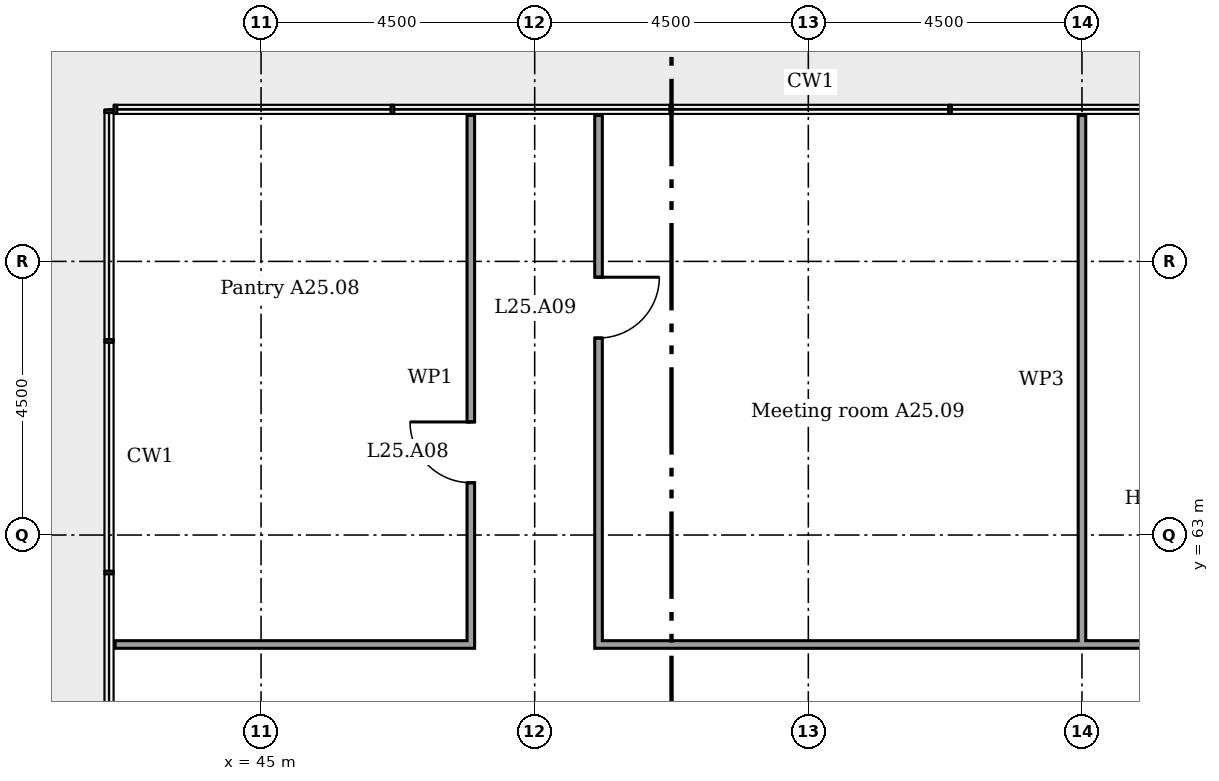
"""IFC4 building model, lengths in metres.
Left out: names, types, materials, properties, quantities, classifications, styles, units other than length and angle.
Written with IfcOpenShell. Run it as: python <this file> out.ifc"""

import sys

from ifc_helpers import new_model, si_unit, direction, frame, frame_2d, origin, place, context, subcontext, project, spatial, rectangle, extrude, element, fill, save


model = new_model("IFC4")
c1 = context("Model", 3, precision=1e-05, world=origin(), true_north=direction((0.0, 1.0)))
c2 = subcontext(c1, "Body", "Model", "MODEL_VIEW")
j1 = project(units=[si_unit("LENGTHUNIT", "METRE"), si_unit("PLANEANGLEUNIT", "RADIAN")], contexts=[c1])
p1 = place(None, origin())
s1 = spatial("IfcSite", under=j1, at=p1, CompositionType="ELEMENT")
p2 = place(p1, origin())
s2 = spatial("IfcBuilding", under=s1, at=p2, CompositionType="ELEMENT")
p3 = place(p2, frame((0.0, 0.0, 102.8)))
s3 = spatial("IfcBuildingStorey", under=s2, at=p3, CompositionType="ELEMENT", Elevation=102.8)
p4 = place(p3, frame((42.6, 61.2, 0.0)))
e1 = element("IfcWall", 1, at=p4, inside=s3, PredefinedType="PARTITIONING", context=c2, shape_type="SweptSolid", body=[
    extrude(rectangle(XDim=5.912, YDim=0.125, at=frame_2d((2.956, 0.0))), origin(), (0.0, 0.0, 1.0), 3.45),
])
p5 = place(p3, frame((50.488, 61.2, 0.0)))
e2 = element("IfcWall", 2, at=p5, inside=s3, PredefinedType="PARTITIONING", context=c2, shape_type="SweptSolid", body=[
    extrude(rectangle(XDim=10.475, YDim=0.125, at=frame_2d((5.237, 0.0))), origin(), (0.0, 0.0, 1.0), 3.45),
])
p6 = place(p3, frame((48.45, 61.262, 0.0), z_axis=(0.0, 0.0, 1.0), x_axis=(0.0, 1.0, 0.0)))
e3 = element("IfcWall", 3, at=p6, inside=s3, PredefinedType="PARTITIONING", context=c2, shape_type="SweptSolid", body=[
    extrude(rectangle(XDim=8.637, YDim=0.125, at=frame_2d((4.319, 0.0))), origin(), (0.0, 0.0, 1.0), 3.45),
])
p7 = place(p6, frame((2.597, 0.0, 0.0)))
e4 = element("IfcOpeningElement", 4, at=p7, cuts=e3, PredefinedType="OPENING", context=c2, shape_type="SweptSolid", body=[
    extrude(rectangle(XDim=1.0, YDim=2.1, at=frame_2d((0.5, 1.05))), frame((0.0, 0.073, 0.0), z_axis=(0.0, -1.0, 0.0), x_axis=(1.0, 0.0, 0.0)), (0.0, 0.0, 1.0), 0.145),
])
p8 = place(p3, frame((50.55, 61.262, 0.0), z_axis=(0.0, 0.0, 1.0), x_axis=(0.0, 1.0, 0.0)))
e5 = element("IfcWall", 5, at=p8, inside=s3, PredefinedType="PARTITIONING", context=c2, shape_type="SweptSolid", body=[
    extrude(rectangle(XDim=8.637, YDim=0.125, at=frame_2d((4.319, 0.0))), origin(), (0.0, 0.0, 1.0), 3.45),
])
p9 = place(p8, frame((4.978, 0.0, 0.0)))
e6 = element("IfcOpeningElement", 6, at=p9, cuts=e5, PredefinedType="OPENING", context=c2, shape_type="SweptSolid", body=[
    extrude(rectangle(XDim=1.0, YDim=2.1, at=frame_2d((0.5, 1.05))), frame((0.0, 0.073, 0.0), z_axis=(0.0, -1.0, 0.0), x_axis=(1.0, 0.0, 0.0)), (0.0, 0.0, 1.0), 0.145),
])
p10 = place(p3, frame((58.5, 61.2, 0.0), z_axis=(0.0, 0.0, 1.0), x_axis=(0.0, 1.0, 0.0)))
e7 = element("IfcWall", 7, at=p10, inside=s3, PredefinedType="MOVABLE", context=c2, shape_type="SweptSolid", body=[
    extrude(rectangle(XDim=8.7, YDim=0.125, at=frame_2d((4.35, 0.0))), origin(), (0.0, 0.0, 1.0), 2.766),
])
p11 = place(p7, origin())
e8 = element("IfcDoor", 8, at=p11, inside=s3, OperationType="SINGLE_SWING_LEFT", PredefinedType="DOOR", context=c2, shape_type="SweptSolid", body=[
    extrude(rectangle(XDim=1.0, YDim=2.1, at=frame_2d((0.5, 1.05))), frame((0.0, 0.025, 0.0), z_axis=(0.0, -1.0, 0.0), x_axis=(1.0, 0.0, 0.0)), (0.0, 0.0, 1.0), 0.05),
])
fill(e4, e8)
p12 = place(p9, frame((1.0, 0.0, 0.0), x_axis=(-1.0, 0.0, 0.0)))
e9 = element("IfcDoor", 9, at=p12, inside=s3, OperationType="SINGLE_SWING_RIGHT", PredefinedType="DOOR", context=c2, shape_type="SweptSolid", body=[
    extrude(rectangle(XDim=1.0, YDim=2.1, at=frame_2d((0.5, 1.05))), frame((0.0, 0.025, 0.0), z_axis=(0.0, -1.0, 0.0), x_axis=(1.0, 0.0, 0.0)), (0.0, 0.0, 1.0), 0.05),
])
fill(e6, e9)
save(model, sys.argv[1])
